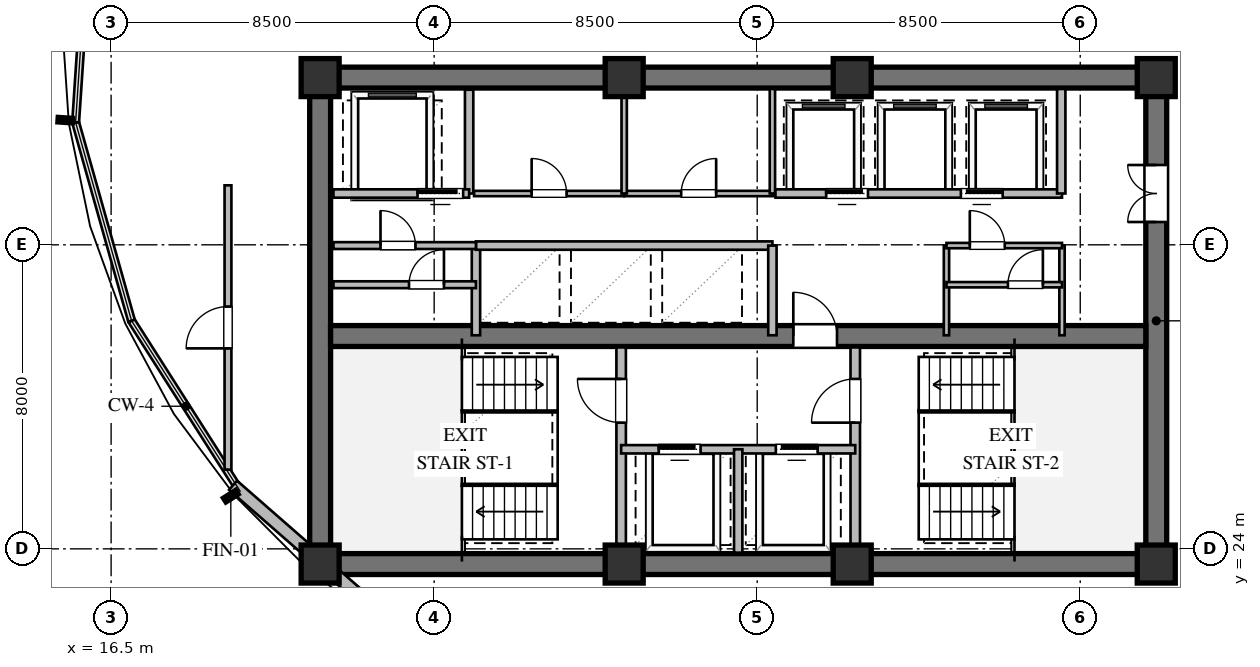
"""IFC4 building model, lengths in metres.
Left out: names, types, materials, properties, quantities, classifications, styles, units other than length and angle.
Written with IfcOpenShell. Run it as: python <this file> out.ifc"""

import sys

from ifc_helpers import new_model, si_unit, direction, frame, frame_2d, origin, origin_2d, place, context, subcontext, project, spatial, rectangle, extrude, element, fill, save


model = new_model("IFC4")
c1 = context("Model", 3, precision=1e-05, world=origin(), true_north=direction((0.0, 1.0)))
c2 = subcontext(c1, "Body", "Model", "MODEL_VIEW")
j1 = project(units=[si_unit("LENGTHUNIT", "METRE"), si_unit("PLANEANGLEUNIT", "RADIAN")], contexts=[c1])
p1 = place(None, origin())
s1 = spatial("IfcSite", under=j1, at=p1, CompositionType="ELEMENT")
p2 = place(p1, origin())
s2 = spatial("IfcBuilding", under=s1, at=p2, CompositionType="ELEMENT")
p3 = place(p2, frame((0.0, 0.0, 113.4)))
s3 = spatial("IfcBuildingStorey", under=s2, at=p3, CompositionType="ELEMENT", Elevation=113.4)
for number, where, z_axis, x_axis in (
    (1, (21.725, 23.6, 0.0), (0.0, 0.0, 1.0), (1.0, 0.0, 0.0)),
    (2, (21.725, 36.4, 0.0), (0.0, 0.0, 1.0), (1.0, 0.0, 0.0)),
):
    element("IfcWall", number, at=place(p3, frame(where, z_axis=z_axis, x_axis=x_axis)), inside=s3, PredefinedType="SHEAR", context=c2, shape_type="SweptSolid", body=[
        extrude(rectangle(XDim=22.55, YDim=0.55, at=frame_2d((11.275, 0.0))), origin(), (0.0, 0.0, 1.0), 3.36),
    ])
p4 = place(p3, frame((22.0, 23.875, 0.0), z_axis=(0.0, 0.0, 1.0), x_axis=(0.0, 1.0, 0.0)))
e3 = element("IfcWall", 3, at=p4, inside=s3, PredefinedType="SHEAR", context=c2, shape_type="SweptSolid", body=[
    extrude(rectangle(XDim=12.25, YDim=0.55, at=frame_2d((6.125, 0.0))), origin(), (0.0, 0.0, 1.0), 3.36),
])
p5 = place(p3, frame((44.0, 23.875, 0.0), z_axis=(0.0, 0.0, 1.0), x_axis=(0.0, 1.0, 0.0)))
e4 = element("IfcWall", 4, at=p5, inside=s3, PredefinedType="SHEAR", context=c2, shape_type="SweptSolid", body=[
    extrude(rectangle(XDim=12.25, YDim=0.55, at=frame_2d((6.125, 0.0))), origin(), (0.0, 0.0, 1.0), 3.36),
])
p6 = place(p5, frame((8.725, 0.0, 0.0)))
e5 = element("IfcOpeningElement", 5, at=p6, cuts=e4, PredefinedType="OPENING", context=c2, shape_type="SweptSolid", body=[
    extrude(rectangle(XDim=1.5, YDim=2.15, at=frame_2d((0.75, 1.075))), frame((0.0, 0.285, 0.0), z_axis=(0.0, -1.0, 0.0), x_axis=(1.0, 0.0, 0.0)), (0.0, 0.0, 1.0), 0.57),
])
p7 = place(p3, frame((22.275, 29.6, 0.0), z_axis=(0.0, 0.0, 1.0), x_axis=(1.0, 0.0, 0.0)))
e6 = element("IfcWall", 6, at=p7, inside=s3, PredefinedType="SHEAR", context=c2, shape_type="SweptSolid", body=[
    extrude(rectangle(XDim=21.45, YDim=0.55, at=frame_2d((10.725, 0.0))), origin(), (0.0, 0.0, 1.0), 3.36),
])
p8 = place(p7, frame((12.175, 0.0, 0.0)))
e7 = element("IfcOpeningElement", 7, at=p8, cuts=e6, PredefinedType="OPENING", context=c2, shape_type="SweptSolid", body=[
    extrude(rectangle(XDim=1.15, YDim=2.1, at=frame_2d((0.575, 1.05))), frame((0.0, 0.285, 0.0), z_axis=(0.0, -1.0, 0.0), x_axis=(1.0, 0.0, 0.0)), (0.0, 0.0, 1.0), 0.57),
])
for number, where, z_axis, x_axis in (
    (8, (22.0, 23.6, 0.0), (0.0, 0.0, 1.0), (1.0, 0.0, 0.0)),
    (9, (30.0, 23.6, 0.0), (0.0, 0.0, 1.0), (1.0, 0.0, 0.0)),
    (10, (36.0, 23.6, 0.0), (0.0, 0.0, 1.0), (1.0, 0.0, 0.0)),
    (11, (44.0, 23.6, 0.0), (0.0, 0.0, 1.0), (1.0, 0.0, 0.0)),
    (12, (44.0, 36.4, 0.0), (0.0, 0.0, 1.0), (1.0, 0.0, 0.0)),
    (13, (36.0, 36.4, 0.0), (0.0, 0.0, 1.0), (1.0, 0.0, 0.0)),
    (14, (30.0, 36.4, 0.0), (0.0, 0.0, 1.0), (1.0, 0.0, 0.0)),
    (15, (22.0, 36.4, 0.0), (0.0, 0.0, 1.0), (1.0, 0.0, 0.0)),
):
    element("IfcColumn", number, at=place(p3, frame(where, z_axis=z_axis, x_axis=x_axis)), inside=s3, PredefinedType="COLUMN", context=c2, shape_type="SweptSolid", body=[
        extrude(rectangle(XDim=1.0, YDim=1.0, at=origin_2d()), origin(), (0.0, 0.0, 1.0), 3.6),
    ])
p9 = place(p3, frame((24.225, 21.727, 0.0), z_axis=(0.0, 0.0, 1.0), x_axis=(-0.753105964003, 0.657899237713, 0.0)))
e16 = element("IfcWall", 16, at=p9, inside=s3, PredefinedType="STANDARD", context=c2, shape_type="SweptSolid", body=[
    extrude(rectangle(XDim=5.998, YDim=0.32, at=frame_2d((2.999, 0.0))), origin(), (0.0, 0.0, 1.0), 2.35),
])
p10 = place(p3, frame((29.92, 23.9, 0.0), z_axis=(0.0, 0.0, 1.0), x_axis=(0.0, 1.0, 0.0)))
e17 = element("IfcWall", 17, at=p10, inside=s3, PredefinedType="SOLIDWALL", context=c2, shape_type="SweptSolid", body=[
    extrude(rectangle(XDim=5.4, YDim=0.25, at=frame_2d((2.7, 0.0))), origin(), (0.0, 0.0, 1.0), 2.89),
])
p11 = place(p10, frame((3.421, 0.0, 0.0)))
e18 = element("IfcOpeningElement", 18, at=p11, cuts=e17, PredefinedType="OPENING", context=c2, shape_type="SweptSolid", body=[
    extrude(rectangle(XDim=1.15, YDim=2.1, at=frame_2d((0.575, 1.05))), frame((0.0, 0.135, 0.0), z_axis=(0.0, -1.0, 0.0), x_axis=(1.0, 0.0, 0.0)), (0.0, 0.0, 1.0), 0.27),
])
p12 = place(p3, frame((36.08, 23.9, 0.0), z_axis=(0.0, 0.0, 1.0), x_axis=(0.0, 1.0, 0.0)))
e19 = element("IfcWall", 19, at=p12, inside=s3, PredefinedType="SOLIDWALL", context=c2, shape_type="SweptSolid", body=[
    extrude(rectangle(XDim=5.4, YDim=0.25, at=frame_2d((2.7, 0.0))), origin(), (0.0, 0.0, 1.0), 3.36),
])
p13 = place(p12, frame((3.421, 0.0, 0.0)))
e20 = element("IfcOpeningElement", 20, at=p13, cuts=e19, PredefinedType="OPENING", context=c2, shape_type="SweptSolid", body=[
    extrude(rectangle(XDim=1.15, YDim=2.1, at=frame_2d((0.575, 1.05))), frame((0.0, 0.135, 0.0), z_axis=(0.0, -1.0, 0.0), x_axis=(1.0, 0.0, 0.0)), (0.0, 0.0, 1.0), 0.27),
])
p14 = place(p3, frame((29.92, 26.62, 0.0), z_axis=(0.0, 0.0, 1.0), x_axis=(1.0, 0.0, 0.0)))
e21 = element("IfcWall", 21, at=p14, inside=s3, PredefinedType="SOLIDWALL", context=c2, shape_type="SweptSolid", body=[
    extrude(rectangle(XDim=6.16, YDim=0.22, at=frame_2d((3.08, 0.0))), origin(), (0.0, 0.0, 1.0), 3.36),
])
p15 = place(p14, frame((0.99, 0.0, 0.0)))
e22 = element("IfcOpeningElement", 22, at=p15, cuts=e21, PredefinedType="OPENING", context=c2, shape_type="SweptSolid", body=[
    extrude(rectangle(XDim=1.1, YDim=2.1, at=frame_2d((0.55, 1.05))), frame((0.0, 0.12, 0.0), z_axis=(0.0, -1.0, 0.0), x_axis=(1.0, 0.0, 0.0)), (0.0, 0.0, 1.0), 0.24),
])
p16 = place(p14, frame((4.07, 0.0, 0.0)))
e23 = element("IfcOpeningElement", 23, at=p16, cuts=e21, PredefinedType="OPENING", context=c2, shape_type="SweptSolid", body=[
    extrude(rectangle(XDim=1.1, YDim=2.1, at=frame_2d((0.55, 1.05))), frame((0.0, 0.12, 0.0), z_axis=(0.0, -1.0, 0.0), x_axis=(1.0, 0.0, 0.0)), (0.0, 0.0, 1.0), 0.24),
])
p17 = place(p3, frame((33.0, 23.9, 0.0), z_axis=(0.0, 0.0, 1.0), x_axis=(0.0, 1.0, 0.0)))
e24 = element("IfcWall", 24, at=p17, inside=s3, PredefinedType="SOLIDWALL", context=c2, shape_type="SweptSolid", body=[
    extrude(rectangle(XDim=2.72, YDim=0.22, at=frame_2d((1.36, 0.0))), origin(), (0.0, 0.0, 1.0), 3.36),
])
p18 = place(p3, frame((25.92, 33.35, 0.0), z_axis=(0.0, 0.0, 1.0), x_axis=(0.0, 1.0, 0.0)))
e25 = element("IfcWall", 25, at=p18, inside=s3, PredefinedType="SOLIDWALL", context=c2, shape_type="SweptSolid", body=[
    extrude(rectangle(XDim=2.73, YDim=0.22, at=frame_2d((1.365, 0.0))), origin(), (0.0, 0.0, 1.0), 3.36),
])
p19 = place(p3, frame((22.35, 33.35, 0.0), z_axis=(0.0, 0.0, 1.0), x_axis=(1.0, 0.0, 0.0)))
e26 = element("IfcWall", 26, at=p19, inside=s3, PredefinedType="SOLIDWALL", context=c2, shape_type="SweptSolid", body=[
    extrude(rectangle(XDim=3.57, YDim=0.22, at=frame_2d((1.785, 0.0))), origin(), (0.0, 0.0, 1.0), 3.36),
])
p20 = place(p19, frame((2.213, 0.0, 0.0)))
e27 = element("IfcOpeningElement", 27, at=p20, cuts=e26, PredefinedType="OPENING", context=c2, shape_type="SweptSolid", body=[
    extrude(rectangle(XDim=1.2, YDim=2.1, at=frame_2d((0.6, 1.05))), frame((0.0, 0.12, 0.0), z_axis=(0.0, -1.0, 0.0), x_axis=(1.0, 0.0, 0.0)), (0.0, 0.0, 1.0), 0.24),
])
p21 = place(p3, frame((26.1, 29.62, 0.0), z_axis=(0.0, 0.0, 1.0), x_axis=(0.0, 1.0, 0.0)))
e28 = element("IfcWall", 28, at=p21, inside=s3, PredefinedType="SOLIDWALL", context=c2, shape_type="SweptSolid", body=[
    extrude(rectangle(XDim=2.36, YDim=0.22, at=frame_2d((1.18, 0.0))), origin(), (0.0, 0.0, 1.0), 3.36),
])
p22 = place(p3, frame((26.1, 31.98, 0.0), z_axis=(0.0, 0.0, 1.0), x_axis=(1.0, 0.0, 0.0)))
e29 = element("IfcWall", 29, at=p22, inside=s3, PredefinedType="SOLIDWALL", context=c2, shape_type="SweptSolid", body=[
    extrude(rectangle(XDim=7.8, YDim=0.22, at=frame_2d((3.9, 0.0))), origin(), (0.0, 0.0, 1.0), 3.36),
])
p23 = place(p3, frame((33.9, 29.62, 0.0), z_axis=(0.0, 0.0, 1.0), x_axis=(0.0, 1.0, 0.0)))
e30 = element("IfcWall", 30, at=p23, inside=s3, PredefinedType="SOLIDWALL", context=c2, shape_type="SweptSolid", body=[
    extrude(rectangle(XDim=2.36, YDim=0.22, at=frame_2d((1.18, 0.0))), origin(), (0.0, 0.0, 1.0), 3.36),
])
p24 = place(p3, frame((26.05, 33.35, 0.0), z_axis=(0.0, 0.0, 1.0), x_axis=(1.0, 0.0, 0.0)))
e31 = element("IfcWall", 31, at=p24, inside=s3, PredefinedType="PARTITIONING", context=c2, shape_type="SweptSolid", body=[
    extrude(rectangle(XDim=3.95, YDim=0.14, at=frame_2d((1.975, 0.0))), origin(), (0.0, 0.0, 1.0), 3.36),
])
p25 = place(p24, frame((1.515, 0.0, 0.0)))
e32 = element("IfcOpeningElement", 32, at=p25, cuts=e31, PredefinedType="OPENING", context=c2, shape_type="SweptSolid", body=[
    extrude(rectangle(XDim=0.92, YDim=2.1, at=frame_2d((0.46, 1.05))), frame((0.0, 0.08, 0.0), z_axis=(0.0, -1.0, 0.0), x_axis=(1.0, 0.0, 0.0)), (0.0, 0.0, 1.0), 0.16),
])
p26 = place(p3, frame((30.0, 33.35, 0.0), z_axis=(0.0, 0.0, 1.0), x_axis=(1.0, 0.0, 0.0)))
e33 = element("IfcWall", 33, at=p26, inside=s3, PredefinedType="PARTITIONING", context=c2, shape_type="SweptSolid", body=[
    extrude(rectangle(XDim=3.92, YDim=0.14, at=frame_2d((1.96, 0.0))), origin(), (0.0, 0.0, 1.0), 3.36),
])
p27 = place(p26, frame((1.5, 0.0, 0.0)))
e34 = element("IfcOpeningElement", 34, at=p27, cuts=e33, PredefinedType="OPENING", context=c2, shape_type="SweptSolid", body=[
    extrude(rectangle(XDim=0.92, YDim=2.1, at=frame_2d((0.46, 1.05))), frame((0.0, 0.08, 0.0), z_axis=(0.0, -1.0, 0.0), x_axis=(1.0, 0.0, 0.0)), (0.0, 0.0, 1.0), 0.16),
])
for number, where, z_axis, x_axis in (
    (35, (30.0, 33.35, 0.0), (0.0, 0.0, 1.0), (0.0, 1.0, 0.0)),
    (36, (33.9, 33.35, 0.0), (0.0, 0.0, 1.0), (0.0, 1.0, 0.0)),
):
    element("IfcWall", number, at=place(p3, frame(where, z_axis=z_axis, x_axis=x_axis)), inside=s3, PredefinedType="PARTITIONING", context=c2, shape_type="SweptSolid", body=[
        extrude(rectangle(XDim=2.75, YDim=0.14, at=frame_2d((1.375, 0.0))), origin(), (0.0, 0.0, 1.0), 3.36),
    ])
p28 = place(p3, frame((33.98, 33.35, 0.0), z_axis=(0.0, 0.0, 1.0), x_axis=(1.0, 0.0, 0.0)))
e37 = element("IfcWall", 37, at=p28, inside=s3, PredefinedType="SOLIDWALL", context=c2, shape_type="SweptSolid", body=[
    extrude(rectangle(XDim=7.54, YDim=0.22, at=frame_2d((3.77, 0.0))), origin(), (0.0, 0.0, 1.0), 3.36),
])
p29 = place(p28, frame((1.335, 0.0, 0.0)))
e38 = element("IfcOpeningElement", 38, at=p29, cuts=e37, PredefinedType="OPENING", context=c2, shape_type="SweptSolid", body=[
    extrude(rectangle(XDim=1.1, YDim=2.1, at=frame_2d((0.55, 1.05))), frame((0.0, 0.12, 0.0), z_axis=(0.0, -1.0, 0.0), x_axis=(1.0, 0.0, 0.0)), (0.0, 0.0, 1.0), 0.24),
])
p30 = place(p28, frame((4.879, 0.0, 0.0)))
e39 = element("IfcOpeningElement", 39, at=p30, cuts=e37, PredefinedType="OPENING", context=c2, shape_type="SweptSolid", body=[
    extrude(rectangle(XDim=1.1, YDim=2.1, at=frame_2d((0.55, 1.05))), frame((0.0, 0.12, 0.0), z_axis=(0.0, -1.0, 0.0), x_axis=(1.0, 0.0, 0.0)), (0.0, 0.0, 1.0), 0.24),
])
p31 = place(p3, frame((41.5, 33.35, 0.0), z_axis=(0.0, 0.0, 1.0), x_axis=(0.0, 1.0, 0.0)))
e40 = element("IfcWall", 40, at=p31, inside=s3, PredefinedType="SOLIDWALL", context=c2, shape_type="SweptSolid", body=[
    extrude(rectangle(XDim=2.75, YDim=0.22, at=frame_2d((1.375, 0.0))), origin(), (0.0, 0.0, 1.0), 3.36),
])
p32 = place(p3, frame((22.35, 30.95, 0.0), z_axis=(0.0, 0.0, 1.0), x_axis=(1.0, 0.0, 0.0)))
e41 = element("IfcWall", 41, at=p32, inside=s3, PredefinedType="PARTITIONING", context=c2, shape_type="SweptSolid", body=[
    extrude(rectangle(XDim=3.75, YDim=0.18, at=frame_2d((1.875, 0.0))), origin(), (0.0, 0.0, 1.0), 3.36),
])
p33 = place(p32, frame((1.988, 0.0, 0.0)))
e42 = element("IfcOpeningElement", 42, at=p33, cuts=e41, PredefinedType="OPENING", context=c2, shape_type="SweptSolid", body=[
    extrude(rectangle(XDim=0.92, YDim=2.1, at=frame_2d((0.46, 1.05))), frame((0.0, 0.1, 0.0), z_axis=(0.0, -1.0, 0.0), x_axis=(1.0, 0.0, 0.0)), (0.0, 0.0, 1.0), 0.2),
])
p34 = place(p3, frame((22.35, 31.98, 0.0), z_axis=(0.0, 0.0, 1.0), x_axis=(1.0, 0.0, 0.0)))
e43 = element("IfcWall", 43, at=p34, inside=s3, PredefinedType="PARTITIONING", context=c2, shape_type="SweptSolid", body=[
    extrude(rectangle(XDim=3.75, YDim=0.18, at=frame_2d((1.875, 0.0))), origin(), (0.0, 0.0, 1.0), 3.36),
])
p35 = place(p34, frame((1.238, 0.0, 0.0)))
e44 = element("IfcOpeningElement", 44, at=p35, cuts=e43, PredefinedType="OPENING", context=c2, shape_type="SweptSolid", body=[
    extrude(rectangle(XDim=0.92, YDim=2.1, at=frame_2d((0.46, 1.05))), frame((0.0, 0.1, 0.0), z_axis=(0.0, -1.0, 0.0), x_axis=(1.0, 0.0, 0.0)), (0.0, 0.0, 1.0), 0.2),
])
for number, where, z_axis, x_axis in (
    (45, (38.48, 29.62, 0.0), (0.0, 0.0, 1.0), (0.0, 1.0, 0.0)),
    (46, (41.52, 29.62, 0.0), (0.0, 0.0, 1.0), (0.0, 1.0, 0.0)),
):
    element("IfcWall", number, at=place(p3, frame(where, z_axis=z_axis, x_axis=x_axis)), inside=s3, PredefinedType="PARTITIONING", context=c2, shape_type="SweptSolid", body=[
        extrude(rectangle(XDim=2.36, YDim=0.14, at=frame_2d((1.18, 0.0))), origin(), (0.0, 0.0, 1.0), 3.36),
    ])
p36 = place(p3, frame((38.48, 30.95, 0.0), z_axis=(0.0, 0.0, 1.0), x_axis=(1.0, 0.0, 0.0)))
e47 = element("IfcWall", 47, at=p36, inside=s3, PredefinedType="PARTITIONING", context=c2, shape_type="SweptSolid", body=[
    extrude(rectangle(XDim=3.04, YDim=0.14, at=frame_2d((1.52, 0.0))), origin(), (0.0, 0.0, 1.0), 3.36),
])
p37 = place(p36, frame((1.617, 0.0, 0.0)))
e48 = element("IfcOpeningElement", 48, at=p37, cuts=e47, PredefinedType="OPENING", context=c2, shape_type="SweptSolid", body=[
    extrude(rectangle(XDim=0.92, YDim=2.1, at=frame_2d((0.46, 1.05))), frame((0.0, 0.08, 0.0), z_axis=(0.0, -1.0, 0.0), x_axis=(1.0, 0.0, 0.0)), (0.0, 0.0, 1.0), 0.16),
])
p38 = place(p3, frame((38.48, 31.98, 0.0), z_axis=(0.0, 0.0, 1.0), x_axis=(1.0, 0.0, 0.0)))
e49 = element("IfcWall", 49, at=p38, inside=s3, PredefinedType="PARTITIONING", context=c2, shape_type="SweptSolid", body=[
    extrude(rectangle(XDim=3.04, YDim=0.14, at=frame_2d((1.52, 0.0))), origin(), (0.0, 0.0, 1.0), 3.36),
])
p39 = place(p38, frame((0.614, 0.0, 0.0)))
e50 = element("IfcOpeningElement", 50, at=p39, cuts=e49, PredefinedType="OPENING", context=c2, shape_type="SweptSolid", body=[
    extrude(rectangle(XDim=0.92, YDim=2.1, at=frame_2d((0.46, 1.05))), frame((0.0, 0.08, 0.0), z_axis=(0.0, -1.0, 0.0), x_axis=(1.0, 0.0, 0.0)), (0.0, 0.0, 1.0), 0.16),
])
p40 = place(p3, frame((19.575, 26.085, 0.0), z_axis=(0.0, 0.0, 1.0), x_axis=(0.0, 1.0, 0.0)))
e51 = element("IfcWall", 51, at=p40, inside=s3, PredefinedType="PARTITIONING", context=c2, shape_type="SweptSolid", body=[
    extrude(rectangle(XDim=7.48, YDim=0.18, at=frame_2d((3.74, 0.0))), origin(), (0.0, 0.0, 1.0), 2.657),
])
p41 = place(p40, frame((3.19, 0.0, 0.0)))
e52 = element("IfcOpeningElement", 52, at=p41, cuts=e51, PredefinedType="OPENING", context=c2, shape_type="SweptSolid", body=[
    extrude(rectangle(XDim=1.1, YDim=2.1, at=frame_2d((0.55, 1.05))), frame((0.0, 0.1, 0.0), z_axis=(0.0, -1.0, 0.0), x_axis=(1.0, 0.0, 0.0)), (0.0, 0.0, 1.0), 0.2),
])
p42 = place(p11, origin())
e53 = element("IfcDoor", 53, at=p42, inside=s3, OperationType="SINGLE_SWING_RIGHT", PredefinedType="DOOR", context=c2, shape_type="SweptSolid", body=[
    extrude(rectangle(XDim=1.15, YDim=2.1, at=frame_2d((0.575, 1.05))), frame((0.0, 0.025, 0.0), z_axis=(0.0, -1.0, 0.0), x_axis=(1.0, 0.0, 0.0)), (0.0, 0.0, 1.0), 0.05),
])
fill(e18, e53)
p43 = place(p13, origin())
e54 = element("IfcDoor", 54, at=p43, inside=s3, OperationType="SINGLE_SWING_LEFT", PredefinedType="DOOR", context=c2, shape_type="SweptSolid", body=[
    extrude(rectangle(XDim=1.15, YDim=2.1, at=frame_2d((0.575, 1.05))), frame((0.0, 0.025, 0.0), z_axis=(0.0, -1.0, 0.0), x_axis=(1.0, 0.0, 0.0)), (0.0, 0.0, 1.0), 0.05),
])
fill(e20, e54)
p44 = place(p15, origin())
e55 = element("IfcDoor", 55, at=p44, inside=s3, OperationType="SLIDING_TO_LEFT", PredefinedType="DOOR", context=c2, shape_type="SweptSolid", body=[
    extrude(rectangle(XDim=1.1, YDim=2.1, at=frame_2d((0.55, 1.05))), frame((0.0, 0.025, 0.0), z_axis=(0.0, -1.0, 0.0), x_axis=(1.0, 0.0, 0.0)), (0.0, 0.0, 1.0), 0.05),
])
fill(e22, e55)
p45 = place(p16, origin())
e56 = element("IfcDoor", 56, at=p45, inside=s3, OperationType="SLIDING_TO_RIGHT", PredefinedType="DOOR", context=c2, shape_type="SweptSolid", body=[
    extrude(rectangle(XDim=1.1, YDim=2.1, at=frame_2d((0.55, 1.05))), frame((0.0, 0.025, 0.0), z_axis=(0.0, -1.0, 0.0), x_axis=(1.0, 0.0, 0.0)), (0.0, 0.0, 1.0), 0.05),
])
fill(e23, e56)
p46 = place(p8, origin())
e57 = element("IfcDoor", 57, at=p46, inside=s3, OperationType="SINGLE_SWING_LEFT", PredefinedType="DOOR", context=c2, shape_type="SweptSolid", body=[
    extrude(rectangle(XDim=1.15, YDim=2.1, at=frame_2d((0.575, 1.05))), frame((0.0, 0.025, 0.0), z_axis=(0.0, -1.0, 0.0), x_axis=(1.0, 0.0, 0.0)), (0.0, 0.0, 1.0), 0.05),
])
fill(e7, e57)
p47 = place(p6, origin())
e58 = element("IfcDoor", 58, at=p47, inside=s3, OperationType="DOUBLE_DOOR_SINGLE_SWING", PredefinedType="DOOR", context=c2, shape_type="SweptSolid", body=[
    extrude(rectangle(XDim=1.5, YDim=2.15, at=frame_2d((0.75, 1.075))), frame((0.0, 0.025, 0.0), z_axis=(0.0, -1.0, 0.0), x_axis=(1.0, 0.0, 0.0)), (0.0, 0.0, 1.0), 0.05),
])
fill(e5, e58)
p48 = place(p20, origin())
e59 = element("IfcDoor", 59, at=p48, inside=s3, OperationType="SLIDING_TO_LEFT", PredefinedType="DOOR", context=c2, shape_type="SweptSolid", body=[
    extrude(rectangle(XDim=1.2, YDim=2.1, at=frame_2d((0.6, 1.05))), frame((0.0, 0.025, 0.0), z_axis=(0.0, -1.0, 0.0), x_axis=(1.0, 0.0, 0.0)), (0.0, 0.0, 1.0), 0.05),
])
fill(e27, e59)
p49 = place(p25, origin())
e60 = element("IfcDoor", 60, at=p49, inside=s3, OperationType="SINGLE_SWING_LEFT", PredefinedType="DOOR", context=c2, shape_type="SweptSolid", body=[
    extrude(rectangle(XDim=0.92, YDim=2.1, at=frame_2d((0.46, 1.05))), frame((0.0, 0.025, 0.0), z_axis=(0.0, -1.0, 0.0), x_axis=(1.0, 0.0, 0.0)), (0.0, 0.0, 1.0), 0.05),
])
fill(e32, e60)
p50 = place(p27, origin())
e61 = element("IfcDoor", 61, at=p50, inside=s3, OperationType="SINGLE_SWING_RIGHT", PredefinedType="DOOR", context=c2, shape_type="SweptSolid", body=[
    extrude(rectangle(XDim=0.92, YDim=2.1, at=frame_2d((0.46, 1.05))), frame((0.0, 0.025, 0.0), z_axis=(0.0, -1.0, 0.0), x_axis=(1.0, 0.0, 0.0)), (0.0, 0.0, 1.0), 0.05),
])
fill(e34, e61)
p51 = place(p29, origin())
e62 = element("IfcDoor", 62, at=p51, inside=s3, OperationType="SLIDING_TO_LEFT", PredefinedType="DOOR", context=c2, shape_type="SweptSolid", body=[
    extrude(rectangle(XDim=1.1, YDim=2.1, at=frame_2d((0.55, 1.05))), frame((0.0, 0.025, 0.0), z_axis=(0.0, -1.0, 0.0), x_axis=(1.0, 0.0, 0.0)), (0.0, 0.0, 1.0), 0.05),
])
fill(e38, e62)
p52 = place(p30, origin())
e63 = element("IfcDoor", 63, at=p52, inside=s3, OperationType="SLIDING_TO_RIGHT", PredefinedType="DOOR", context=c2, shape_type="SweptSolid", body=[
    extrude(rectangle(XDim=1.1, YDim=2.1, at=frame_2d((0.55, 1.05))), frame((0.0, 0.025, 0.0), z_axis=(0.0, -1.0, 0.0), x_axis=(1.0, 0.0, 0.0)), (0.0, 0.0, 1.0), 0.05),
])
fill(e39, e63)
p53 = place(p35, origin())
e64 = element("IfcDoor", 64, at=p53, inside=s3, OperationType="SINGLE_SWING_LEFT", PredefinedType="DOOR", context=c2, shape_type="SweptSolid", body=[
    extrude(rectangle(XDim=0.92, YDim=2.1, at=frame_2d((0.46, 1.05))), frame((0.0, 0.025, 0.0), z_axis=(0.0, -1.0, 0.0), x_axis=(1.0, 0.0, 0.0)), (0.0, 0.0, 1.0), 0.05),
])
fill(e44, e64)
p54 = place(p33, origin())
e65 = element("IfcDoor", 65, at=p54, inside=s3, OperationType="SINGLE_SWING_RIGHT", PredefinedType="DOOR", context=c2, shape_type="SweptSolid", body=[
    extrude(rectangle(XDim=0.92, YDim=2.1, at=frame_2d((0.46, 1.05))), frame((0.0, 0.025, 0.0), z_axis=(0.0, -1.0, 0.0), x_axis=(1.0, 0.0, 0.0)), (0.0, 0.0, 1.0), 0.05),
])
fill(e42, e65)
p55 = place(p39, origin())
e66 = element("IfcDoor", 66, at=p55, inside=s3, OperationType="SINGLE_SWING_LEFT", PredefinedType="DOOR", context=c2, shape_type="SweptSolid", body=[
    extrude(rectangle(XDim=0.92, YDim=2.1, at=frame_2d((0.46, 1.05))), frame((0.0, 0.025, 0.0), z_axis=(0.0, -1.0, 0.0), x_axis=(1.0, 0.0, 0.0)), (0.0, 0.0, 1.0), 0.05),
])
fill(e50, e66)
p56 = place(p37, origin())
e67 = element("IfcDoor", 67, at=p56, inside=s3, OperationType="SINGLE_SWING_RIGHT", PredefinedType="DOOR", context=c2, shape_type="SweptSolid", body=[
    extrude(rectangle(XDim=0.92, YDim=2.1, at=frame_2d((0.46, 1.05))), frame((0.0, 0.025, 0.0), z_axis=(0.0, -1.0, 0.0), x_axis=(1.0, 0.0, 0.0)), (0.0, 0.0, 1.0), 0.05),
])
fill(e48, e67)
p57 = place(p41, origin())
e68 = element("IfcDoor", 68, at=p57, inside=s3, OperationType="SINGLE_SWING_LEFT", PredefinedType="DOOR", context=c2, shape_type="SweptSolid", body=[
    extrude(rectangle(XDim=1.1, YDim=2.1, at=frame_2d((0.55, 1.05))), frame((0.0, 0.025, 0.0), z_axis=(0.0, -1.0, 0.0), x_axis=(1.0, 0.0, 0.0)), (0.0, 0.0, 1.0), 0.05),
])
fill(e52, e68)
save(model, sys.argv[1])
